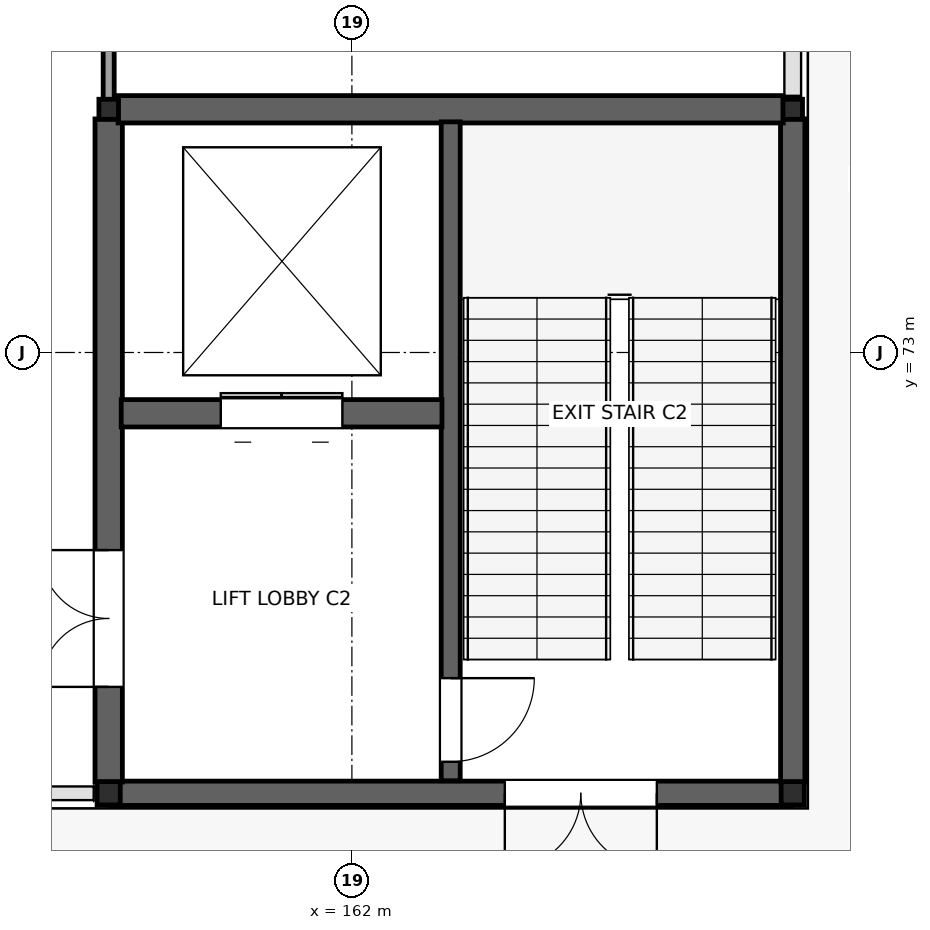
"""IFC4 building model, lengths in metres.
Left out: names, types, materials, properties, quantities, classifications, styles, units other than length and angle.
Written with IfcOpenShell. Run it as: python <this file> out.ifc"""

import sys

from ifc_helpers import new_model, si_unit, direction, frame, frame_2d, origin, origin_2d, place, context, subcontext, project, spatial, rectangle, i_section, extrude, element, fill, save


model = new_model("IFC4")
c1 = context("Model", 3, precision=1e-05, world=origin(), true_north=direction((0.0, 1.0)))
c2 = subcontext(c1, "Body", "Model", "MODEL_VIEW")
j1 = project(units=[si_unit("LENGTHUNIT", "METRE"), si_unit("PLANEANGLEUNIT", "RADIAN")], contexts=[c1])
p1 = place(None, origin())
s1 = spatial("IfcSite", under=j1, at=p1, CompositionType="ELEMENT")
p2 = place(p1, origin())
s2 = spatial("IfcBuilding", under=s1, at=p2, CompositionType="ELEMENT")
p3 = place(p2, origin())
s3 = spatial("IfcBuildingStorey", under=s2, at=p3, CompositionType="ELEMENT", Elevation=0.0)
for number, where, z_axis, x_axis in (
    (1, (158.8, 67.2, 0.0), (0.0, 0.0, 1.0), (1.0, 0.0, 0.0)),
    (2, (167.8, 67.2, 0.0), (0.0, 0.0, 1.0), (1.0, 0.0, 0.0)),
):
    element("IfcColumn", number, at=place(p3, frame(where, z_axis=z_axis, x_axis=x_axis)), inside=s3, PredefinedType="COLUMN", context=c2, shape_type="SweptSolid", body=[
        extrude(i_section(OverallWidth=0.305, OverallDepth=0.307, WebThickness=0.01, FlangeThickness=0.015, at=origin_2d()), origin(), (0.0, 0.0, 1.0), 6.0),
    ])
for number, where, z_axis, x_axis in (
    (3, (158.8, 76.2, 0.0), (0.0, 0.0, 1.0), (1.0, 0.0, 0.0)),
    (4, (167.8, 76.2, 0.0), (0.0, 0.0, 1.0), (1.0, 0.0, 0.0)),
):
    element("IfcColumn", number, at=place(p3, frame(where, z_axis=z_axis, x_axis=x_axis)), inside=s3, PredefinedType="COLUMN", context=c2, shape_type="SweptSolid", body=[
        extrude(i_section(OverallWidth=0.257, OverallDepth=0.264, WebThickness=0.012, FlangeThickness=0.02, at=origin_2d()), origin(), (0.0, 0.0, 1.0), 6.0),
    ])
p4 = place(p3, frame((167.788, 67.2, 0.0), z_axis=(0.0, 0.0, 1.0), x_axis=(-1.0, 0.0, 0.0)))
e5 = element("IfcWall", 5, at=p4, inside=s3, PredefinedType="STANDARD", context=c2, shape_type="SweptSolid", body=[
    extrude(rectangle(XDim=8.976, YDim=0.32, at=frame_2d((4.488, 0.0))), origin(), (0.0, 0.0, 1.0), 5.78),
])
p5 = place(p4, frame((1.776, 0.0, 0.0)))
e6 = element("IfcOpeningElement", 6, at=p5, cuts=e5, PredefinedType="OPENING", context=c2, shape_type="SweptSolid", body=[
    extrude(rectangle(XDim=2.0, YDim=2.4, at=frame_2d((1.0, 1.2))), frame((0.0, 0.17, 0.0), z_axis=(0.0, -1.0, 0.0), x_axis=(1.0, 0.0, 0.0)), (0.0, 0.0, 1.0), 0.34),
])
p6 = place(p3, frame((167.8, 76.074, 0.0), z_axis=(0.0, 0.0, 1.0), x_axis=(0.0, -1.0, 0.0)))
e7 = element("IfcWall", 7, at=p6, inside=s3, PredefinedType="STANDARD", context=c2, shape_type="SweptSolid", body=[
    extrude(rectangle(XDim=8.727, YDim=0.32, at=frame_2d((4.364, 0.0))), origin(), (0.0, 0.0, 1.0), 5.78),
])
p7 = place(p3, frame((158.8, 67.348, 0.0), z_axis=(0.0, 0.0, 1.0), x_axis=(0.0, 1.0, 0.0)))
e8 = element("IfcWall", 8, at=p7, inside=s3, PredefinedType="SHEAR", context=c2, shape_type="SweptSolid", body=[
    extrude(rectangle(XDim=8.725, YDim=0.36, at=frame_2d((4.363, 0.0))), origin(), (0.0, 0.0, 1.0), 5.78),
])
p8 = place(p7, frame((1.252, 0.0, 0.0)))
e9 = element("IfcOpeningElement", 9, at=p8, cuts=e8, PredefinedType="OPENING", context=c2, shape_type="SweptSolid", body=[
    extrude(rectangle(XDim=1.8, YDim=2.3, at=frame_2d((0.9, 1.15))), frame((0.0, 0.19, 0.0), z_axis=(0.0, -1.0, 0.0), x_axis=(1.0, 0.0, 0.0)), (0.0, 0.0, 1.0), 0.38),
])
p9 = place(p3, frame((158.924, 76.2, 0.0), z_axis=(0.0, 0.0, 1.0), x_axis=(1.0, 0.0, 0.0)))
e10 = element("IfcWall", 10, at=p9, inside=s3, PredefinedType="SHEAR", context=c2, shape_type="SweptSolid", body=[
    extrude(rectangle(XDim=8.752, YDim=0.36, at=frame_2d((4.376, 0.0))), origin(), (0.0, 0.0, 1.0), 5.78),
])
p10 = place(p3, frame((163.3, 76.035, 0.0), z_axis=(0.0, 0.0, 1.0), x_axis=(0.0, -1.0, 0.0)))
e11 = element("IfcWall", 11, at=p10, inside=s3, PredefinedType="SHEAR", context=c2, shape_type="SweptSolid", body=[
    extrude(rectangle(XDim=8.67, YDim=0.25, at=frame_2d((4.335, 0.0))), origin(), (0.0, 0.0, 1.0), 5.78),
])
p11 = place(p10, frame((7.32, 0.0, 0.0)))
e12 = element("IfcOpeningElement", 12, at=p11, cuts=e11, PredefinedType="OPENING", context=c2, shape_type="SweptSolid", body=[
    extrude(rectangle(XDim=1.1, YDim=2.2, at=frame_2d((0.55, 1.1))), frame((0.0, 0.135, 0.0), z_axis=(0.0, -1.0, 0.0), x_axis=(1.0, 0.0, 0.0)), (0.0, 0.0, 1.0), 0.27),
])
p12 = place(p3, frame((158.965, 72.2, 0.0), z_axis=(0.0, 0.0, 1.0), x_axis=(1.0, 0.0, 0.0)))
e13 = element("IfcWall", 13, at=p12, inside=s3, PredefinedType="SHEAR", context=c2, shape_type="SweptSolid", body=[
    extrude(rectangle(XDim=4.22, YDim=0.36, at=frame_2d((2.11, 0.0))), origin(), (0.0, 0.0, 1.0), 5.78),
])
p13 = place(p12, frame((1.31, 0.0, 0.0)))
e14 = element("IfcOpeningElement", 14, at=p13, cuts=e13, PredefinedType="OPENING", context=c2, shape_type="SweptSolid", body=[
    extrude(rectangle(XDim=1.6, YDim=2.4, at=frame_2d((0.8, 1.2))), frame((0.0, 0.19, 0.0), z_axis=(0.0, -1.0, 0.0), x_axis=(1.0, 0.0, 0.0)), (0.0, 0.0, 1.0), 0.38),
])
p14 = place(p3, frame((158.8, 76.327, 0.0), z_axis=(0.0, 0.0, 1.0), x_axis=(0.0, 1.0, 0.0)))
e15 = element("IfcWall", 15, at=p14, inside=s3, PredefinedType="PARTITIONING", context=c2, shape_type="SweptSolid", body=[
    extrude(rectangle(XDim=8.546, YDim=0.145, at=frame_2d((4.273, 0.0))), origin(), (0.0, 0.0, 1.0), 5.2),
])
p15 = place(p14, frame((3.2, 0.0, 0.0)))
e16 = element("IfcOpeningElement", 16, at=p15, cuts=e15, PredefinedType="OPENING", context=c2, shape_type="SweptSolid", body=[
    extrude(rectangle(XDim=1.65, YDim=2.25, at=frame_2d((0.825, 1.125))), frame((0.0, 0.083, 0.0), z_axis=(0.0, -1.0, 0.0), x_axis=(1.0, 0.0, 0.0)), (0.0, 0.0, 1.0), 0.165),
])
p16 = place(p5, origin())
e17 = element("IfcDoor", 17, at=p16, inside=s3, OperationType="DOUBLE_DOOR_SINGLE_SWING", PredefinedType="DOOR", context=c2, shape_type="SweptSolid", body=[
    extrude(rectangle(XDim=2.0, YDim=2.4, at=frame_2d((1.0, 1.2))), frame((0.0, 0.025, 0.0), z_axis=(0.0, -1.0, 0.0), x_axis=(1.0, 0.0, 0.0)), (0.0, 0.0, 1.0), 0.05),
])
fill(e6, e17)
p17 = place(p11, origin())
e18 = element("IfcDoor", 18, at=p17, inside=s3, OperationType="SINGLE_SWING_LEFT", PredefinedType="DOOR", context=c2, shape_type="SweptSolid", body=[
    extrude(rectangle(XDim=1.1, YDim=2.2, at=frame_2d((0.55, 1.1))), frame((0.0, 0.025, 0.0), z_axis=(0.0, -1.0, 0.0), x_axis=(1.0, 0.0, 0.0)), (0.0, 0.0, 1.0), 0.05),
])
fill(e12, e18)
p18 = place(p13, origin())
e19 = element("IfcDoor", 19, at=p18, inside=s3, OperationType="DOUBLE_DOOR_SLIDING", PredefinedType="DOOR", context=c2, shape_type="SweptSolid", body=[
    extrude(rectangle(XDim=1.6, YDim=2.4, at=frame_2d((0.8, 1.2))), frame((0.0, 0.025, 0.0), z_axis=(0.0, -1.0, 0.0), x_axis=(1.0, 0.0, 0.0)), (0.0, 0.0, 1.0), 0.05),
])
fill(e14, e19)
p19 = place(p8, origin())
e20 = element("IfcDoor", 20, at=p19, inside=s3, OperationType="DOUBLE_DOOR_SINGLE_SWING", PredefinedType="DOOR", context=c2, shape_type="SweptSolid", body=[
    extrude(rectangle(XDim=1.8, YDim=2.3, at=frame_2d((0.9, 1.15))), frame((0.0, 0.025, 0.0), z_axis=(0.0, -1.0, 0.0), x_axis=(1.0, 0.0, 0.0)), (0.0, 0.0, 1.0), 0.05),
])
fill(e9, e20)
save(model, sys.argv[1])
